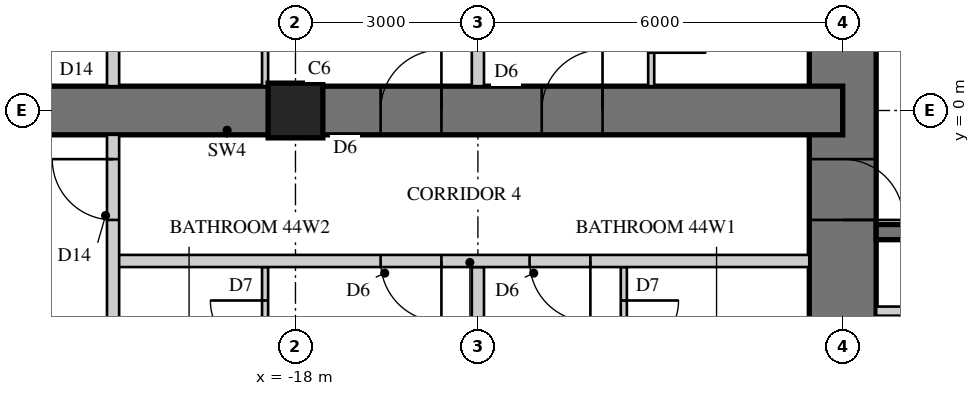
"""IFC4 building model, lengths in metres.
Left out: names, types, materials, properties, quantities, classifications, styles, units other than length and angle.
Written with IfcOpenShell. Run it as: python <this file> out.ifc"""

import sys

from ifc_helpers import new_model, si_unit, direction, frame, frame_2d, origin, origin_2d, place, context, subcontext, project, spatial, rectangle, extrude, element, fill, save


model = new_model("IFC4")
c1 = context("Model", 3, precision=1e-05, world=origin(), true_north=direction((0.0, 1.0)))
c2 = subcontext(c1, "Body", "Model", "MODEL_VIEW")
j1 = project(units=[si_unit("LENGTHUNIT", "METRE"), si_unit("PLANEANGLEUNIT", "RADIAN")], contexts=[c1])
p1 = place(None, origin())
s1 = spatial("IfcSite", under=j1, at=p1, CompositionType="ELEMENT")
p2 = place(p1, origin())
s2 = spatial("IfcBuilding", under=s1, at=p2, CompositionType="ELEMENT")
p3 = place(p2, frame((0.0, 0.0, 179.7)))
s3 = spatial("IfcBuildingStorey", under=s2, at=p3, CompositionType="ELEMENT", Elevation=179.7)
p4 = place(p3, frame((-9.0, 9.0, 0.0), z_axis=(0.0, 0.0, 1.0), x_axis=(0.0, -1.0, 0.0)))
e1 = element("IfcWall", 1, at=p4, inside=s3, PredefinedType="SHEAR", context=c2, shape_type="SweptSolid", body=[
    extrude(rectangle(XDim=18.0, YDim=1.1, at=frame_2d((9.0, 0.0))), origin(), (0.0, 0.0, 1.0), 3.4),
])
p5 = place(p4, frame((9.8, 0.0, 0.0)))
e2 = element("IfcOpeningElement", 2, at=p5, cuts=e1, PredefinedType="OPENING", context=c2, shape_type="SweptSolid", body=[
    extrude(rectangle(XDim=1.0, YDim=2.4, at=frame_2d((0.5, 1.2))), frame((0.0, 0.56, 0.0), z_axis=(0.0, -1.0, 0.0), x_axis=(1.0, 0.0, 0.0)), (0.0, 0.0, 1.0), 1.12),
])
p6 = place(p3, frame((-1.925, -2.0, 0.0), z_axis=(0.0, 0.0, 1.0), x_axis=(-1.0, 0.0, 0.0)))
e3 = element("IfcWall", 3, at=p6, inside=s3, PredefinedType="SHEAR", context=c2, shape_type="SweptSolid", body=[
    extrude(rectangle(XDim=6.525, YDim=0.25, at=frame_2d((3.262, 0.0))), origin(), (0.0, 0.0, 1.0), 3.4),
])
p7 = place(p3, frame((-1.925, -3.3, 0.0), z_axis=(0.0, 0.0, 1.0), x_axis=(-1.0, 0.0, 0.0)))
e4 = element("IfcWall", 4, at=p7, inside=s3, PredefinedType="PARTITIONING", context=c2, shape_type="SweptSolid", body=[
    extrude(rectangle(XDim=6.525, YDim=0.15, at=frame_2d((3.262, 0.0))), origin(), (0.0, 0.0, 1.0), 3.4),
])
p8 = place(p7, frame((0.075, 0.0, 0.0)))
e5 = element("IfcOpeningElement", 5, at=p8, cuts=e4, PredefinedType="OPENING", context=c2, shape_type="SweptSolid", body=[
    extrude(rectangle(XDim=0.8, YDim=2.1, at=frame_2d((0.4, 1.05))), frame((0.0, 0.085, 0.0), z_axis=(0.0, -1.0, 0.0), x_axis=(1.0, 0.0, 0.0)), (0.0, 0.0, 1.0), 0.17),
])
p9 = place(p7, frame((3.675, 0.0, 0.0)))
e6 = element("IfcOpeningElement", 6, at=p9, cuts=e4, PredefinedType="OPENING", context=c2, shape_type="SweptSolid", body=[
    extrude(rectangle(XDim=0.8, YDim=2.1, at=frame_2d((0.4, 1.05))), frame((0.0, 0.085, 0.0), z_axis=(0.0, -1.0, 0.0), x_axis=(1.0, 0.0, 0.0)), (0.0, 0.0, 1.0), 0.17),
])
p10 = place(p3, frame((-9.0, 0.0, 0.0), z_axis=(0.0, 0.0, 1.0), x_axis=(-1.0, 0.0, 0.0)))
e7 = element("IfcWall", 7, at=p10, inside=s3, PredefinedType="SHEAR", context=c2, shape_type="SweptSolid", body=[
    extrude(rectangle(XDim=18.0, YDim=0.8, at=frame_2d((9.0, 0.0))), origin(), (0.0, 0.0, 1.0), 3.4),
])
p11 = place(p10, frame((3.95, 0.0, 0.0)))
e8 = element("IfcOpeningElement", 8, at=p11, cuts=e7, PredefinedType="OPENING", context=c2, shape_type="SweptSolid", body=[
    extrude(rectangle(XDim=1.0, YDim=2.15, at=frame_2d((0.5, 1.075))), frame((0.0, 0.41, 0.0), z_axis=(0.0, -1.0, 0.0), x_axis=(1.0, 0.0, 0.0)), (0.0, 0.0, 1.0), 0.82),
])
p12 = place(p10, frame((6.6, 0.0, 0.0)))
e9 = element("IfcOpeningElement", 9, at=p12, cuts=e7, PredefinedType="OPENING", context=c2, shape_type="SweptSolid", body=[
    extrude(rectangle(XDim=1.0, YDim=2.15, at=frame_2d((0.5, 1.075))), frame((0.0, 0.41, 0.0), z_axis=(0.0, -1.0, 0.0), x_axis=(1.0, 0.0, 0.0)), (0.0, 0.0, 1.0), 0.82),
])
p13 = place(p10, frame((13.25, 0.0, 0.0)))
e10 = element("IfcOpeningElement", 10, at=p13, cuts=e7, PredefinedType="OPENING", context=c2, shape_type="SweptSolid", body=[
    extrude(rectangle(XDim=1.0, YDim=2.2, at=frame_2d((0.5, 1.1))), frame((0.0, 0.41, 0.0), z_axis=(0.0, -1.0, 0.0), x_axis=(1.0, 0.0, 0.0)), (0.0, 0.0, 1.0), 0.82),
])
p14 = place(p3, frame((-18.0, 0.0, 0.0), z_axis=(0.0, 0.0, 1.0), x_axis=(1.0, 0.0, 0.0)))
e11 = element("IfcColumn", 11, at=p14, inside=s3, PredefinedType="COLUMN", context=c2, shape_type="SweptSolid", body=[
    extrude(rectangle(XDim=0.9, YDim=0.9, at=origin_2d()), origin(), (0.0, 0.0, 1.0), 3.4),
])
p15 = place(p3, frame((-12.6, -2.575, 0.0), z_axis=(0.0, 0.0, 1.0), x_axis=(0.0, -1.0, 0.0)))
e12 = element("IfcWall", 12, at=p15, inside=s3, PredefinedType="PARTITIONING", context=c2, shape_type="SweptSolid", body=[
    extrude(rectangle(XDim=6.87, YDim=0.1, at=frame_2d((3.435, 0.0))), origin(), (0.0, 0.0, 1.0), 3.22),
])
p16 = place(p15, frame((0.55, 0.0, 0.0)))
e13 = element("IfcOpeningElement", 13, at=p16, cuts=e12, PredefinedType="OPENING", context=c2, shape_type="SweptSolid", body=[
    extrude(rectangle(XDim=0.9, YDim=2.1, at=frame_2d((0.45, 1.05))), frame((0.0, 0.06, 0.0), z_axis=(0.0, -1.0, 0.0), x_axis=(1.0, 0.0, 0.0)), (0.0, 0.0, 1.0), 0.12),
])
p17 = place(p15, frame((2.65, 0.0, 0.0)))
e14 = element("IfcOpeningElement", 14, at=p17, cuts=e12, PredefinedType="OPENING", context=c2, shape_type="SweptSolid", body=[
    extrude(rectangle(XDim=0.9, YDim=2.1, at=frame_2d((0.45, 1.05))), frame((0.0, 0.06, 0.0), z_axis=(0.0, -1.0, 0.0), x_axis=(1.0, 0.0, 0.0)), (0.0, 0.0, 1.0), 0.12),
])
p18 = place(p3, frame((-12.15, 9.445, 0.0), z_axis=(0.0, 0.0, 1.0), x_axis=(0.0, -1.0, 0.0)))
e15 = element("IfcWall", 15, at=p18, inside=s3, PredefinedType="PARTITIONING", context=c2, shape_type="SweptSolid", body=[
    extrude(rectangle(XDim=9.045, YDim=0.1, at=frame_2d((4.522, 0.0))), origin(), (0.0, 0.0, 1.0), 3.22),
])
p19 = place(p18, frame((5.495, 0.0, 0.0)))
e16 = element("IfcOpeningElement", 16, at=p19, cuts=e15, PredefinedType="OPENING", context=c2, shape_type="SweptSolid", body=[
    extrude(rectangle(XDim=0.9, YDim=2.1, at=frame_2d((0.45, 1.05))), frame((0.0, 0.06, 0.0), z_axis=(0.0, -1.0, 0.0), x_axis=(1.0, 0.0, 0.0)), (0.0, 0.0, 1.0), 0.12),
])
p20 = place(p18, frame((7.595, 0.0, 0.0)))
e17 = element("IfcOpeningElement", 17, at=p20, cuts=e15, PredefinedType="OPENING", context=c2, shape_type="SweptSolid", body=[
    extrude(rectangle(XDim=0.9, YDim=2.1, at=frame_2d((0.45, 1.05))), frame((0.0, 0.06, 0.0), z_axis=(0.0, -1.0, 0.0), x_axis=(1.0, 0.0, 0.0)), (0.0, 0.0, 1.0), 0.12),
])
p21 = place(p3, frame((-15.0, -2.575, 0.0), z_axis=(0.0, 0.0, 1.0), x_axis=(0.0, -1.0, 0.0)))
e18 = element("IfcWall", 18, at=p21, inside=s3, PredefinedType="SOLIDWALL", context=c2, shape_type="SweptSolid", body=[
    extrude(rectangle(XDim=5.975, YDim=0.2, at=frame_2d((2.988, 0.0))), origin(), (0.0, 0.0, 1.0), 2.47),
])
p22 = place(p3, frame((-15.0, 8.55, 0.0), z_axis=(0.0, 0.0, 1.0), x_axis=(0.0, -1.0, 0.0)))
e19 = element("IfcWall", 19, at=p22, inside=s3, PredefinedType="SOLIDWALL", context=c2, shape_type="SweptSolid", body=[
    extrude(rectangle(XDim=8.15, YDim=0.2, at=frame_2d((4.075, 0.0))), origin(), (0.0, 0.0, 1.0), 2.47),
])
p23 = place(p3, frame((-18.5, -2.575, 0.0), z_axis=(0.0, 0.0, 1.0), x_axis=(0.0, -1.0, 0.0)))
e20 = element("IfcWall", 20, at=p23, inside=s3, PredefinedType="PARTITIONING", context=c2, shape_type="SweptSolid", body=[
    extrude(rectangle(XDim=2.2, YDim=0.1, at=frame_2d((1.1, 0.0))), origin(), (0.0, 0.0, 1.0), 3.22),
])
p24 = place(p23, frame((0.55, 0.0, 0.0)))
e21 = element("IfcOpeningElement", 21, at=p24, cuts=e20, PredefinedType="OPENING", context=c2, shape_type="SweptSolid", body=[
    extrude(rectangle(XDim=0.9, YDim=2.1, at=frame_2d((0.45, 1.05))), frame((0.0, 0.06, 0.0), z_axis=(0.0, -1.0, 0.0), x_axis=(1.0, 0.0, 0.0)), (0.0, 0.0, 1.0), 0.12),
])
p25 = place(p3, frame((-18.5, 3.0, 0.0), z_axis=(0.0, 0.0, 1.0), x_axis=(0.0, -1.0, 0.0)))
e22 = element("IfcWall", 22, at=p25, inside=s3, PredefinedType="PARTITIONING", context=c2, shape_type="SweptSolid", body=[
    extrude(rectangle(XDim=2.6, YDim=0.1, at=frame_2d((1.3, 0.0))), origin(), (0.0, 0.0, 1.0), 3.22),
])
p26 = place(p25, frame((0.55, 0.0, 0.0)))
e23 = element("IfcOpeningElement", 23, at=p26, cuts=e22, PredefinedType="OPENING", context=c2, shape_type="SweptSolid", body=[
    extrude(rectangle(XDim=0.9, YDim=2.1, at=frame_2d((0.45, 1.05))), frame((0.0, 0.06, 0.0), z_axis=(0.0, -1.0, 0.0), x_axis=(1.0, 0.0, 0.0)), (0.0, 0.0, 1.0), 0.12),
])
p27 = place(p3, frame((-9.55, -2.475, 0.0), z_axis=(0.0, 0.0, 1.0), x_axis=(-1.0, 0.0, 0.0)))
e24 = element("IfcWall", 24, at=p27, inside=s3, PredefinedType="SOLIDWALL", context=c2, shape_type="SweptSolid", body=[
    extrude(rectangle(XDim=11.45, YDim=0.2, at=frame_2d((5.725, 0.0))), origin(), (0.0, 0.0, 1.0), 3.22),
])
p28 = place(p27, frame((3.6, 0.0, 0.0)))
e25 = element("IfcOpeningElement", 25, at=p28, cuts=e24, PredefinedType="OPENING", context=c2, shape_type="SweptSolid", body=[
    extrude(rectangle(XDim=1.0, YDim=2.15, at=frame_2d((0.5, 1.075))), frame((0.0, 0.11, 0.0), z_axis=(0.0, -1.0, 0.0), x_axis=(1.0, 0.0, 0.0)), (0.0, 0.0, 1.0), 0.22),
])
p29 = place(p27, frame((6.05, 0.0, 0.0)))
e26 = element("IfcOpeningElement", 26, at=p29, cuts=e24, PredefinedType="OPENING", context=c2, shape_type="SweptSolid", body=[
    extrude(rectangle(XDim=1.0, YDim=2.15, at=frame_2d((0.5, 1.075))), frame((0.0, 0.11, 0.0), z_axis=(0.0, -1.0, 0.0), x_axis=(1.0, 0.0, 0.0)), (0.0, 0.0, 1.0), 0.22),
])
p30 = place(p3, frame((-21.0, 9.0, 0.0), z_axis=(0.0, 0.0, 1.0), x_axis=(0.0, -1.0, 0.0)))
e27 = element("IfcWall", 27, at=p30, inside=s3, PredefinedType="SOLIDWALL", context=c2, shape_type="SweptSolid", body=[
    extrude(rectangle(XDim=8.6, YDim=0.2, at=frame_2d((4.3, 0.0))), origin(), (0.0, 0.0, 1.0), 2.62),
])
p31 = place(p3, frame((-21.0, -0.4, 0.0), z_axis=(0.0, 0.0, 1.0), x_axis=(0.0, -1.0, 0.0)))
e28 = element("IfcWall", 28, at=p31, inside=s3, PredefinedType="SOLIDWALL", context=c2, shape_type="SweptSolid", body=[
    extrude(rectangle(XDim=8.6, YDim=0.2, at=frame_2d((4.3, 0.0))), origin(), (0.0, 0.0, 1.0), 2.62),
])
p32 = place(p31, frame((0.4, 0.0, 0.0)))
e29 = element("IfcOpeningElement", 29, at=p32, cuts=e28, PredefinedType="OPENING", context=c2, shape_type="SweptSolid", body=[
    extrude(rectangle(XDim=1.0, YDim=2.2, at=frame_2d((0.5, 1.1))), frame((0.0, 0.11, 0.0), z_axis=(0.0, -1.0, 0.0), x_axis=(1.0, 0.0, 0.0)), (0.0, 0.0, 1.0), 0.22),
])
p33 = place(p16, origin())
e30 = element("IfcDoor", 30, at=p33, inside=s3, OperationType="SINGLE_SWING_LEFT", PredefinedType="DOOR", context=c2, shape_type="SweptSolid", body=[
    extrude(rectangle(XDim=0.9, YDim=2.1, at=frame_2d((0.45, 1.05))), frame((0.0, 0.025, 0.0), z_axis=(0.0, -1.0, 0.0), x_axis=(1.0, 0.0, 0.0)), (0.0, 0.0, 1.0), 0.05),
])
fill(e13, e30)
p34 = place(p20, origin())
e31 = element("IfcDoor", 31, at=p34, inside=s3, OperationType="SINGLE_SWING_RIGHT", PredefinedType="DOOR", context=c2, shape_type="SweptSolid", body=[
    extrude(rectangle(XDim=0.9, YDim=2.1, at=frame_2d((0.45, 1.05))), frame((0.0, 0.025, 0.0), z_axis=(0.0, -1.0, 0.0), x_axis=(1.0, 0.0, 0.0)), (0.0, 0.0, 1.0), 0.05),
])
fill(e17, e31)
p35 = place(p24, frame((0.9, 0.0, 0.0), z_axis=(0.0, 0.0, 1.0), x_axis=(-1.0, 0.0, 0.0)))
e32 = element("IfcDoor", 32, at=p35, inside=s3, OperationType="SINGLE_SWING_RIGHT", PredefinedType="DOOR", context=c2, shape_type="SweptSolid", body=[
    extrude(rectangle(XDim=0.9, YDim=2.1, at=frame_2d((0.45, 1.05))), frame((0.0, 0.025, 0.0), z_axis=(0.0, -1.0, 0.0), x_axis=(1.0, 0.0, 0.0)), (0.0, 0.0, 1.0), 0.05),
])
fill(e21, e32)
p36 = place(p28, origin())
e33 = element("IfcDoor", 33, at=p36, inside=s3, OperationType="SINGLE_SWING_LEFT", PredefinedType="DOOR", context=c2, shape_type="SweptSolid", body=[
    extrude(rectangle(XDim=1.0, YDim=2.15, at=frame_2d((0.5, 1.075))), frame((0.0, 0.025, 0.0), z_axis=(0.0, -1.0, 0.0), x_axis=(1.0, 0.0, 0.0)), (0.0, 0.0, 1.0), 0.05),
])
fill(e25, e33)
p37 = place(p29, origin())
e34 = element("IfcDoor", 34, at=p37, inside=s3, OperationType="SINGLE_SWING_LEFT", PredefinedType="DOOR", context=c2, shape_type="SweptSolid", body=[
    extrude(rectangle(XDim=1.0, YDim=2.15, at=frame_2d((0.5, 1.075))), frame((0.0, 0.025, 0.0), z_axis=(0.0, -1.0, 0.0), x_axis=(1.0, 0.0, 0.0)), (0.0, 0.0, 1.0), 0.05),
])
fill(e26, e34)
p38 = place(p32, frame((1.0, 0.0, 0.0), z_axis=(0.0, 0.0, 1.0), x_axis=(-1.0, 0.0, 0.0)))
e35 = element("IfcDoor", 35, at=p38, inside=s3, OperationType="SINGLE_SWING_RIGHT", PredefinedType="DOOR", context=c2, shape_type="SweptSolid", body=[
    extrude(rectangle(XDim=1.0, YDim=2.2, at=frame_2d((0.5, 1.1))), frame((0.0, 0.025, 0.0), z_axis=(0.0, -1.0, 0.0), x_axis=(1.0, 0.0, 0.0)), (0.0, 0.0, 1.0), 0.05),
])
fill(e29, e35)
p39 = place(p11, frame((1.0, 0.0, 0.0), z_axis=(0.0, 0.0, 1.0), x_axis=(-1.0, 0.0, 0.0)))
e36 = element("IfcDoor", 36, at=p39, inside=s3, OperationType="SINGLE_SWING_RIGHT", PredefinedType="DOOR", context=c2, shape_type="SweptSolid", body=[
    extrude(rectangle(XDim=1.0, YDim=2.15, at=frame_2d((0.5, 1.075))), frame((0.0, 0.025, 0.0), z_axis=(0.0, -1.0, 0.0), x_axis=(1.0, 0.0, 0.0)), (0.0, 0.0, 1.0), 0.05),
])
fill(e8, e36)
p40 = place(p12, frame((1.0, 0.0, 0.0), z_axis=(0.0, 0.0, 1.0), x_axis=(-1.0, 0.0, 0.0)))
e37 = element("IfcDoor", 37, at=p40, inside=s3, OperationType="SINGLE_SWING_RIGHT", PredefinedType="DOOR", context=c2, shape_type="SweptSolid", body=[
    extrude(rectangle(XDim=1.0, YDim=2.15, at=frame_2d((0.5, 1.075))), frame((0.0, 0.025, 0.0), z_axis=(0.0, -1.0, 0.0), x_axis=(1.0, 0.0, 0.0)), (0.0, 0.0, 1.0), 0.05),
])
fill(e9, e37)
p41 = place(p5, origin())
e38 = element("IfcDoor", 38, at=p41, inside=s3, OperationType="SINGLE_SWING_RIGHT", PredefinedType="DOOR", context=c2, shape_type="SweptSolid", body=[
    extrude(rectangle(XDim=1.0, YDim=2.4, at=frame_2d((0.5, 1.2))), frame((0.0, 0.055, 0.0), z_axis=(0.0, -1.0, 0.0), x_axis=(1.0, 0.0, 0.0)), (0.0, 0.0, 1.0), 0.05),
])
fill(e2, e38)
save(model, sys.argv[1])
